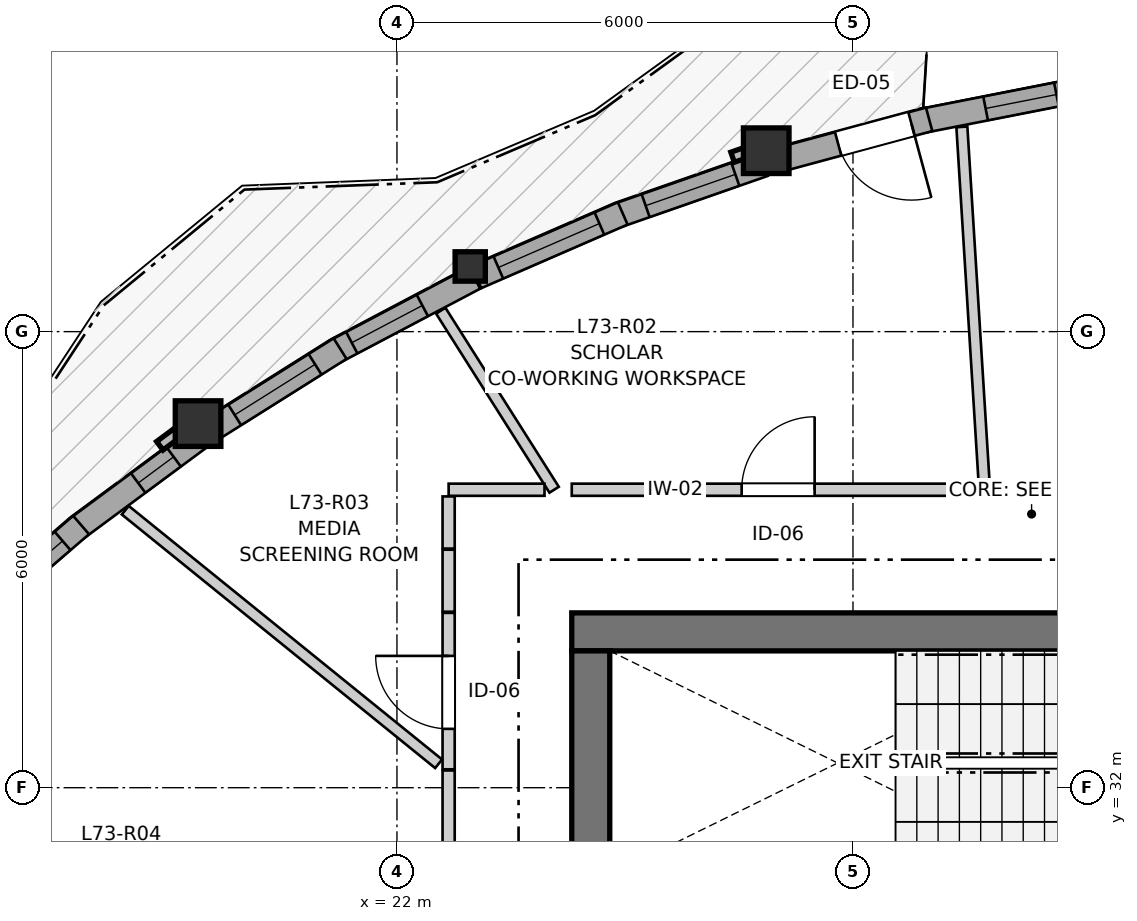
"""IFC4 building model, lengths in metres.
Left out: names, types, materials, properties, quantities, classifications, styles, units other than length and angle.
Written with IfcOpenShell. Run it as: python <this file> out.ifc"""

import sys

from ifc_helpers import new_model, si_unit, direction, frame, frame_2d, origin, origin_2d, place, context, subcontext, project, spatial, rectangle, i_section, extrude, source, transform, mapped, element, fill, save


model = new_model("IFC4")
c1 = context("Model", 3, precision=1e-05, world=origin(), true_north=direction((0.0, 1.0)))
c2 = subcontext(c1, "Body", "Model", "MODEL_VIEW")
j1 = project(units=[si_unit("LENGTHUNIT", "METRE"), si_unit("PLANEANGLEUNIT", "RADIAN")], contexts=[c1])
p1 = place(None, origin())
s1 = spatial("IfcSite", under=j1, at=p1, CompositionType="ELEMENT")
p2 = place(p1, origin())
s2 = spatial("IfcBuilding", under=s1, at=p2, CompositionType="ELEMENT")
p3 = place(p2, frame((0.0, 0.0, 243.6)))
s3 = spatial("IfcBuildingStorey", under=s2, at=p3, CompositionType="ELEMENT", Elevation=243.6)
p4 = place(p3, frame((36.4, 34.05, 0.0), z_axis=(0.0, 0.0, 1.0), x_axis=(-1.0, 0.0, 0.0)))
e1 = element("IfcWall", 1, at=p4, inside=s3, PredefinedType="SHEAR", context=c2, shape_type="SweptSolid", body=[
    extrude(rectangle(XDim=12.1, YDim=0.5, at=frame_2d((6.05, 0.0))), origin(), (0.0, 0.0, 1.0), 2.96),
])
p5 = place(p3, frame((24.55, 33.8, 0.0), z_axis=(0.0, 0.0, 1.0), x_axis=(0.0, -1.0, 0.0)))
e2 = element("IfcWall", 2, at=p5, inside=s3, PredefinedType="SHEAR", context=c2, shape_type="SweptSolid", body=[
    extrude(rectangle(XDim=15.6, YDim=0.5, at=frame_2d((7.8, 0.0))), origin(), (0.0, 0.0, 1.0), 2.96),
])
p6 = place(p5, frame((7.05, 0.0, 0.0)))
e3 = element("IfcOpeningElement", 3, at=p6, cuts=e2, PredefinedType="OPENING", context=c2, shape_type="SweptSolid", body=[
    extrude(rectangle(XDim=1.5, YDim=2.15, at=frame_2d((0.75, 1.075))), frame((0.0, 0.26, 0.0), z_axis=(0.0, -1.0, 0.0), x_axis=(1.0, 0.0, 0.0)), (0.0, 0.0, 1.0), 0.52),
])
p7 = place(p5, frame((3.52, 0.0, 0.0)))
e4 = element("IfcOpeningElement", 4, at=p7, cuts=e2, PredefinedType="OPENING", context=c2, shape_type="SweptSolid", body=[
    extrude(rectangle(XDim=0.86, YDim=2.05, at=frame_2d((0.43, 1.025))), frame((0.0, 0.26, 0.0), z_axis=(0.0, -1.0, 0.0), x_axis=(1.0, 0.0, 0.0)), (0.0, 0.0, 1.0), 0.52),
])
p8 = place(p5, frame((11.22, 0.0, 0.0)))
e5 = element("IfcOpeningElement", 5, at=p8, cuts=e2, PredefinedType="OPENING", context=c2, shape_type="SweptSolid", body=[
    extrude(rectangle(XDim=0.86, YDim=2.05, at=frame_2d((0.43, 1.025))), frame((0.0, 0.26, 0.0), z_axis=(0.0, -1.0, 0.0), x_axis=(1.0, 0.0, 0.0)), (0.0, 0.0, 1.0), 0.52),
])
m1 = source(origin(), c2, "Body", "SweptSolid", [
    extrude(rectangle(XDim=0.6, YDim=0.6, at=origin_2d()), origin(), (0.0, 0.0, 1.0), 2.96),
])
p9 = place(p3, frame((26.859, 40.38, 0.0), z_axis=(0.0, 0.0, 1.0), x_axis=(1.0, 0.0, 0.0)))
e6 = element("IfcColumn", 6, at=p9, inside=s3, PredefinedType="COLUMN", context=c2, shape_type="MappedRepresentation", body=[
    mapped(m1, transform((0.0, 0.0, 0.0), x_axis=(1.0, 0.0, 0.0), y_axis=(0.0, 1.0, 0.0), z_axis=(0.0, 0.0, 1.0), scale=1.0)),
])
m2 = source(origin(), c2, "Body", "SweptSolid", [
    extrude(i_section(OverallWidth=0.398, OverallDepth=0.387, WebThickness=0.019, FlangeThickness=0.03, FilletRadius=0.015, at=origin_2d()), origin(), (0.0, 0.0, 1.0), 2.96),
])
p10 = place(p3, frame((22.964, 38.857, 0.0), z_axis=(0.0, 0.0, 1.0), x_axis=(1.0, 0.0, 0.0)))
e7 = element("IfcColumn", 7, at=p10, inside=s3, PredefinedType="PILASTER", context=c2, shape_type="MappedRepresentation", body=[
    mapped(m2, transform((0.0, 0.0, 0.0), x_axis=(1.0, 0.0, 0.0), y_axis=(0.0, 1.0, 0.0), z_axis=(0.0, 0.0, 1.0), scale=1.0)),
])
p11 = place(p3, frame((19.383, 36.79, 0.0), z_axis=(0.0, 0.0, 1.0), x_axis=(1.0, 0.0, 0.0)))
e8 = element("IfcColumn", 8, at=p11, inside=s3, PredefinedType="COLUMN", context=c2, shape_type="MappedRepresentation", body=[
    mapped(m1, transform((0.0, 0.0, 0.0), x_axis=(1.0, 0.0, 0.0), y_axis=(0.0, 1.0, 0.0), z_axis=(0.0, 0.0, 1.0), scale=1.0)),
])
p12 = place(p3, frame((31.079, 41.198, 0.0), z_axis=(0.0, 0.0, 1.0), x_axis=(-0.981223354781, -0.192874902544, 0.0)))
e9 = element("IfcWall", 9, at=p12, inside=s3, PredefinedType="SOLIDWALL", context=c2, shape_type="SweptSolid", body=[
    extrude(rectangle(XDim=2.202, YDim=0.32, at=frame_2d((1.101, 0.0))), origin(), (0.0, 0.0, 1.0), 2.58),
])
p13 = place(p12, frame((0.409, 0.0, 0.82)))
e10 = element("IfcOpeningElement", 10, at=p13, cuts=e9, PredefinedType="OPENING", context=c2, shape_type="SweptSolid", body=[
    extrude(rectangle(XDim=0.95, YDim=1.35, at=frame_2d((0.475, 0.675))), frame((0.0, 0.17, 0.0), z_axis=(0.0, -1.0, 0.0), x_axis=(1.0, 0.0, 0.0)), (0.0, 0.0, 1.0), 0.34),
])
p14 = place(p3, frame((29.002, 40.793, 0.0), z_axis=(0.0, 0.0, 1.0), x_axis=(-0.965467637734, -0.260523013357, 0.0)))
e11 = element("IfcWall", 11, at=p14, inside=s3, PredefinedType="SOLIDWALL", context=c2, shape_type="SweptSolid", body=[
    extrude(rectangle(XDim=2.087, YDim=0.32, at=frame_2d((1.043, 0.0))), origin(), (0.0, 0.0, 1.0), 2.58),
])
p15 = place(p14, frame((0.24, 0.0, 0.0)))
e12 = element("IfcOpeningElement", 12, at=p15, cuts=e11, PredefinedType="OPENING", context=c2, shape_type="SweptSolid", body=[
    extrude(rectangle(XDim=1.0, YDim=2.1, at=frame_2d((0.5, 1.05))), frame((0.0, 0.17, 0.0), z_axis=(0.0, -1.0, 0.0), x_axis=(1.0, 0.0, 0.0)), (0.0, 0.0, 1.0), 0.34),
])
p16 = place(p3, frame((26.826, 40.199, 0.0), z_axis=(0.0, 0.0, 1.0), x_axis=(-0.944152853185, -0.329507799335, 0.0)))
e13 = element("IfcWall", 13, at=p16, inside=s3, PredefinedType="SOLIDWALL", context=c2, shape_type="SweptSolid", body=[
    extrude(rectangle(XDim=2.052, YDim=0.32, at=frame_2d((1.026, 0.0))), origin(), (0.0, 0.0, 1.0), 2.58),
])
p17 = place(p16, frame((0.396, 0.0, 0.82)))
e14 = element("IfcOpeningElement", 14, at=p17, cuts=e13, PredefinedType="OPENING", context=c2, shape_type="SweptSolid", body=[
    extrude(rectangle(XDim=1.25, YDim=1.35, at=frame_2d((0.625, 0.675))), frame((0.0, 0.17, 0.0), z_axis=(0.0, -1.0, 0.0), x_axis=(1.0, 0.0, 0.0)), (0.0, 0.0, 1.0), 0.34),
])
p18 = place(p3, frame((24.97, 39.555, 0.0), z_axis=(0.0, 0.0, 1.0), x_axis=(-0.917086701486, -0.398687825193, 0.0)))
e15 = element("IfcWall", 15, at=p18, inside=s3, PredefinedType="SOLIDWALL", context=c2, shape_type="SweptSolid", body=[
    extrude(rectangle(XDim=2.099, YDim=0.32, at=frame_2d((1.049, 0.0))), origin(), (0.0, 0.0, 1.0), 2.58),
])
p19 = place(p18, frame((0.334, 0.0, 0.82)))
e16 = element("IfcOpeningElement", 16, at=p19, cuts=e15, PredefinedType="OPENING", context=c2, shape_type="SweptSolid", body=[
    extrude(rectangle(XDim=1.45, YDim=1.25, at=frame_2d((0.725, 0.625))), frame((0.0, 0.17, 0.0), z_axis=(0.0, -1.0, 0.0), x_axis=(1.0, 0.0, 0.0)), (0.0, 0.0, 1.0), 0.34),
])
p20 = place(p3, frame((23.021, 38.707, 0.0), z_axis=(0.0, 0.0, 1.0), x_axis=(-0.884384752847, -0.466758619558, 0.0)))
e17 = element("IfcWall", 17, at=p20, inside=s3, PredefinedType="SOLIDWALL", context=c2, shape_type="SweptSolid", body=[
    extrude(rectangle(XDim=2.087, YDim=0.32, at=frame_2d((1.043, 0.0))), origin(), (0.0, 0.0, 1.0), 2.58),
])
p21 = place(p20, frame((0.777, 0.0, 0.82)))
e18 = element("IfcOpeningElement", 18, at=p21, cuts=e17, PredefinedType="OPENING", context=c2, shape_type="SweptSolid", body=[
    extrude(rectangle(XDim=1.05, YDim=1.45, at=frame_2d((0.525, 0.725))), frame((0.0, 0.17, 0.0), z_axis=(0.0, -1.0, 0.0), x_axis=(1.0, 0.0, 0.0)), (0.0, 0.0, 1.0), 0.34),
])
p22 = place(p3, frame((21.252, 37.777, 0.0), z_axis=(0.0, 0.0, 1.0), x_axis=(-0.846382416581, -0.532575633034, 0.0)))
e19 = element("IfcWall", 19, at=p22, inside=s3, PredefinedType="SOLIDWALL", context=c2, shape_type="SweptSolid", body=[
    extrude(rectangle(XDim=2.017, YDim=0.32, at=frame_2d((1.008, 0.0))), origin(), (0.0, 0.0, 1.0), 2.58),
])
p23 = place(p22, frame((0.388, 0.0, 0.82)))
e20 = element("IfcOpeningElement", 20, at=p23, cuts=e19, PredefinedType="OPENING", context=c2, shape_type="SweptSolid", body=[
    extrude(rectangle(XDim=1.25, YDim=1.35, at=frame_2d((0.625, 0.675))), frame((0.0, 0.17, 0.0), z_axis=(0.0, -1.0, 0.0), x_axis=(1.0, 0.0, 0.0)), (0.0, 0.0, 1.0), 0.34),
])
p24 = place(p3, frame((19.406, 36.608, 0.0), z_axis=(0.0, 0.0, 1.0), x_axis=(-0.803853407146, -0.594827453821, 0.0)))
e21 = element("IfcWall", 21, at=p24, inside=s3, PredefinedType="SOLIDWALL", context=c2, shape_type="SweptSolid", body=[
    extrude(rectangle(XDim=2.029, YDim=0.32, at=frame_2d((1.014, 0.0))), origin(), (0.0, 0.0, 1.0), 2.58),
])
p25 = place(p24, frame((0.428, 0.0, 0.82)))
e22 = element("IfcOpeningElement", 22, at=p25, cuts=e21, PredefinedType="OPENING", context=c2, shape_type="SweptSolid", body=[
    extrude(rectangle(XDim=0.58, YDim=1.35, at=frame_2d((0.29, 0.675))), frame((0.0, 0.17, 0.0), z_axis=(0.0, -1.0, 0.0), x_axis=(1.0, 0.0, 0.0)), (0.0, 0.0, 1.0), 0.34),
])
p26 = place(p3, frame((17.844, 35.456, 0.0), z_axis=(0.0, 0.0, 1.0), x_axis=(-0.757409961601, -0.652939622069, 0.0)))
e23 = element("IfcWall", 23, at=p26, inside=s3, PredefinedType="SOLIDWALL", context=c2, shape_type="SweptSolid", body=[
    extrude(rectangle(XDim=2.122, YDim=0.32, at=frame_2d((1.061, 0.0))), origin(), (0.0, 0.0, 1.0), 2.58),
])
p27 = place(p26, frame((0.321, 0.0, 0.82)))
e24 = element("IfcOpeningElement", 24, at=p27, cuts=e23, PredefinedType="OPENING", context=c2, shape_type="SweptSolid", body=[
    extrude(rectangle(XDim=1.5, YDim=1.45, at=frame_2d((0.75, 0.725))), frame((0.0, 0.17, 0.0), z_axis=(0.0, -1.0, 0.0), x_axis=(1.0, 0.0, 0.0)), (0.0, 0.0, 1.0), 0.34),
])
p28 = place(p3, frame((24.3, 35.92, 0.0), z_axis=(0.0, 0.0, 1.0), x_axis=(1.0, 0.0, 0.0)))
e25 = element("IfcWall", 25, at=p28, inside=s3, PredefinedType="PARTITIONING", context=c2, shape_type="SweptSolid", body=[
    extrude(rectangle(XDim=5.446, YDim=0.16, at=frame_2d((2.723, 0.0))), origin(), (0.0, 0.0, 1.0), 2.96),
])
p29 = place(p28, frame((2.236, 0.0, 0.0)))
e26 = element("IfcOpeningElement", 26, at=p29, cuts=e25, PredefinedType="OPENING", context=c2, shape_type="SweptSolid", body=[
    extrude(rectangle(XDim=0.96, YDim=2.1, at=frame_2d((0.48, 1.05))), frame((0.0, 0.09, 0.0), z_axis=(0.0, -1.0, 0.0), x_axis=(1.0, 0.0, 0.0)), (0.0, 0.0, 1.0), 0.18),
])
p30 = place(p3, frame((22.68, 27.85, 0.0), z_axis=(0.0, 0.0, 1.0), x_axis=(0.0, 1.0, 0.0)))
e27 = element("IfcWall", 27, at=p30, inside=s3, PredefinedType="PARTITIONING", context=c2, shape_type="SweptSolid", body=[
    extrude(rectangle(XDim=4.377, YDim=0.16, at=frame_2d((2.188, 0.0))), origin(), (0.0, 0.0, 1.0), 2.96),
])
p31 = place(p30, frame((1.559, 0.0, 0.0)))
e28 = element("IfcOpeningElement", 28, at=p31, cuts=e27, PredefinedType="OPENING", context=c2, shape_type="SweptSolid", body=[
    extrude(rectangle(XDim=1.3, YDim=2.1, at=frame_2d((0.65, 1.05))), frame((0.0, 0.09, 0.0), z_axis=(0.0, -1.0, 0.0), x_axis=(1.0, 0.0, 0.0)), (0.0, 0.0, 1.0), 0.18),
])
p32 = place(p3, frame((29.761, 35.92, 0.0), z_axis=(0.0, 0.0, 1.0), x_axis=(1.0, 0.0, 0.0)))
e29 = element("IfcWall", 29, at=p32, inside=s3, PredefinedType="PARTITIONING", context=c2, shape_type="SweptSolid", body=[
    extrude(rectangle(XDim=3.61, YDim=0.16, at=frame_2d((1.805, 0.0))), origin(), (0.0, 0.0, 1.0), 2.96),
])
p33 = place(p32, frame((1.133, 0.0, 0.0)))
e30 = element("IfcOpeningElement", 30, at=p33, cuts=e29, PredefinedType="OPENING", context=c2, shape_type="SweptSolid", body=[
    extrude(rectangle(XDim=1.3, YDim=2.1, at=frame_2d((0.65, 1.05))), frame((0.0, 0.09, 0.0), z_axis=(0.0, -1.0, 0.0), x_axis=(1.0, 0.0, 0.0)), (0.0, 0.0, 1.0), 0.18),
])
p34 = place(p3, frame((22.68, 32.242, 0.0), z_axis=(0.0, 0.0, 1.0), x_axis=(0.0, 1.0, 0.0)))
e31 = element("IfcWall", 31, at=p34, inside=s3, PredefinedType="PARTITIONING", context=c2, shape_type="SweptSolid", body=[
    extrude(rectangle(XDim=2.058, YDim=0.16, at=frame_2d((1.029, 0.0))), origin(), (0.0, 0.0, 1.0), 2.628),
])
p35 = place(p34, frame((0.532, 0.0, 0.0)))
e32 = element("IfcOpeningElement", 32, at=p35, cuts=e31, PredefinedType="OPENING", context=c2, shape_type="SweptSolid", body=[
    extrude(rectangle(XDim=0.96, YDim=2.1, at=frame_2d((0.48, 1.05))), frame((0.0, 0.09, 0.0), z_axis=(0.0, -1.0, 0.0), x_axis=(1.0, 0.0, 0.0)), (0.0, 0.0, 1.0), 0.18),
])
p36 = place(p3, frame((18.426, 35.651, 0.0), z_axis=(0.0, 0.0, 1.0), x_axis=(0.777348848989, -0.629069763202, 0.0)))
e33 = element("IfcWall", 33, at=p36, inside=s3, PredefinedType="PARTITIONING", context=c2, shape_type="SweptSolid", body=[
    extrude(rectangle(XDim=5.303, YDim=0.145, at=frame_2d((2.652, 0.0))), origin(), (0.0, 0.0, 1.0), 2.96),
])
p37 = place(p3, frame((29.433, 40.694, 0.0), z_axis=(0.0, 0.0, 1.0), x_axis=(0.062358842424, -0.998053793526, 0.0)))
e34 = element("IfcWall", 34, at=p37, inside=s3, PredefinedType="PARTITIONING", context=c2, shape_type="SweptSolid", body=[
    extrude(rectangle(XDim=4.69, YDim=0.145, at=frame_2d((2.345, 0.0))), origin(), (0.0, 0.0, 1.0), 2.96),
])
p38 = place(p3, frame((22.576, 38.275, 0.0), z_axis=(0.0, 0.0, 1.0), x_axis=(0.535027081988, -0.84483490786, 0.0)))
e35 = element("IfcWall", 35, at=p38, inside=s3, PredefinedType="PARTITIONING", context=c2, shape_type="SweptSolid", body=[
    extrude(rectangle(XDim=2.788, YDim=0.145, at=frame_2d((1.394, 0.0))), origin(), (0.0, 0.0, 1.0), 2.96),
])
p39 = place(p3, frame((22.68, 35.92, 0.0), z_axis=(0.0, 0.0, 1.0), x_axis=(1.0, 0.0, 0.0)))
e36 = element("IfcWall", 36, at=p39, inside=s3, PredefinedType="PARTITIONING", context=c2, shape_type="SweptSolid", body=[
    extrude(rectangle(XDim=1.261, YDim=0.16, at=frame_2d((0.631, 0.0))), origin(), (0.0, 0.0, 1.0), 2.96),
])
p40 = place(p3, frame((22.68, 34.315, 0.0), z_axis=(0.0, 0.0, 1.0), x_axis=(0.0, 1.0, 0.0)))
e37 = element("IfcWall", 37, at=p40, inside=s3, PredefinedType="PARTITIONING", context=c2, shape_type="SweptSolid", body=[
    extrude(rectangle(XDim=0.816, YDim=0.16, at=frame_2d((0.408, 0.0))), origin(), (0.0, 0.0, 1.0), 2.96),
])
p41 = place(p3, frame((22.68, 35.146, 0.0), z_axis=(0.0, 0.0, 1.0), x_axis=(0.0, 1.0, 0.0)))
e38 = element("IfcWall", 38, at=p41, inside=s3, PredefinedType="PARTITIONING", context=c2, shape_type="SweptSolid", body=[
    extrude(rectangle(XDim=0.686, YDim=0.16, at=frame_2d((0.343, 0.0))), origin(), (0.0, 0.0, 1.0), 2.96),
])
m3 = source(origin(), c2, "Body", "SweptSolid", [
    extrude(rectangle(XDim=0.95, YDim=1.35, at=frame_2d((0.475, 0.675))), frame((0.0, 0.03, 0.0), z_axis=(0.0, -1.0, 0.0), x_axis=(1.0, 0.0, 0.0)), (0.0, 0.0, 1.0), 0.06),
])
p42 = place(p13, origin())
e39 = element("IfcWindow", 39, at=p42, inside=s3, PartitioningType="SINGLE_PANEL", PredefinedType="WINDOW", context=c2, shape_type="MappedRepresentation", body=[
    mapped(m3, transform((0.0, 0.0, 0.0), x_axis=(1.0, 0.0, 0.0), y_axis=(0.0, 1.0, 0.0), z_axis=(0.0, 0.0, 1.0), scale=1.0)),
])
fill(e10, e39)
m4 = source(origin(), c2, "Body", "SweptSolid", [
    extrude(rectangle(XDim=1.25, YDim=1.35, at=frame_2d((0.625, 0.675))), frame((0.0, 0.03, 0.0), z_axis=(0.0, -1.0, 0.0), x_axis=(1.0, 0.0, 0.0)), (0.0, 0.0, 1.0), 0.06),
])
p43 = place(p17, origin())
e40 = element("IfcWindow", 40, at=p43, inside=s3, PartitioningType="SINGLE_PANEL", PredefinedType="WINDOW", context=c2, shape_type="MappedRepresentation", body=[
    mapped(m4, transform((0.0, 0.0, 0.0), x_axis=(1.0, 0.0, 0.0), y_axis=(0.0, 1.0, 0.0), z_axis=(0.0, 0.0, 1.0), scale=1.0)),
])
fill(e14, e40)
m5 = source(origin(), c2, "Body", "SweptSolid", [
    extrude(rectangle(XDim=1.45, YDim=1.25, at=frame_2d((0.725, 0.625))), frame((0.0, 0.03, 0.0), z_axis=(0.0, -1.0, 0.0), x_axis=(1.0, 0.0, 0.0)), (0.0, 0.0, 1.0), 0.06),
])
p44 = place(p19, origin())
e41 = element("IfcWindow", 41, at=p44, inside=s3, PartitioningType="SINGLE_PANEL", PredefinedType="WINDOW", context=c2, shape_type="MappedRepresentation", body=[
    mapped(m5, transform((0.0, 0.0, 0.0), x_axis=(1.0, 0.0, 0.0), y_axis=(0.0, 1.0, 0.0), z_axis=(0.0, 0.0, 1.0), scale=1.0)),
])
fill(e16, e41)
m6 = source(origin(), c2, "Body", "SweptSolid", [
    extrude(rectangle(XDim=1.05, YDim=1.45, at=frame_2d((0.525, 0.725))), frame((0.0, 0.03, 0.0), z_axis=(0.0, -1.0, 0.0), x_axis=(1.0, 0.0, 0.0)), (0.0, 0.0, 1.0), 0.06),
])
p45 = place(p21, origin())
e42 = element("IfcWindow", 42, at=p45, inside=s3, PartitioningType="SINGLE_PANEL", PredefinedType="WINDOW", context=c2, shape_type="MappedRepresentation", body=[
    mapped(m6, transform((0.0, 0.0, 0.0), x_axis=(1.0, 0.0, 0.0), y_axis=(0.0, 1.0, 0.0), z_axis=(0.0, 0.0, 1.0), scale=1.0)),
])
fill(e18, e42)
p46 = place(p23, origin())
e43 = element("IfcWindow", 43, at=p46, inside=s3, PartitioningType="SINGLE_PANEL", PredefinedType="WINDOW", context=c2, shape_type="MappedRepresentation", body=[
    mapped(m4, transform((0.0, 0.0, 0.0), x_axis=(1.0, 0.0, 0.0), y_axis=(0.0, 1.0, 0.0), z_axis=(0.0, 0.0, 1.0), scale=1.0)),
])
fill(e20, e43)
m7 = source(origin(), c2, "Body", "SweptSolid", [
    extrude(rectangle(XDim=0.58, YDim=1.35, at=frame_2d((0.29, 0.675))), frame((0.0, 0.03, 0.0), z_axis=(0.0, -1.0, 0.0), x_axis=(1.0, 0.0, 0.0)), (0.0, 0.0, 1.0), 0.06),
])
p47 = place(p25, origin())
e44 = element("IfcWindow", 44, at=p47, inside=s3, PartitioningType="SINGLE_PANEL", PredefinedType="WINDOW", context=c2, shape_type="MappedRepresentation", body=[
    mapped(m7, transform((0.0, 0.0, 0.0), x_axis=(1.0, 0.0, 0.0), y_axis=(0.0, 1.0, 0.0), z_axis=(0.0, 0.0, 1.0), scale=1.0)),
])
fill(e22, e44)
m8 = source(origin(), c2, "Body", "SweptSolid", [
    extrude(rectangle(XDim=1.5, YDim=1.45, at=frame_2d((0.75, 0.725))), frame((0.0, 0.03, 0.0), z_axis=(0.0, -1.0, 0.0), x_axis=(1.0, 0.0, 0.0)), (0.0, 0.0, 1.0), 0.06),
])
p48 = place(p27, origin())
e45 = element("IfcWindow", 45, at=p48, inside=s3, PartitioningType="SINGLE_PANEL", PredefinedType="WINDOW", context=c2, shape_type="MappedRepresentation", body=[
    mapped(m8, transform((0.0, 0.0, 0.0), x_axis=(1.0, 0.0, 0.0), y_axis=(0.0, 1.0, 0.0), z_axis=(0.0, 0.0, 1.0), scale=1.0)),
])
fill(e24, e45)
m9 = source(origin(), c2, "Body", "SweptSolid", [
    extrude(rectangle(XDim=1.0, YDim=2.1, at=frame_2d((0.5, 1.05))), frame((0.0, 0.025, 0.0), z_axis=(0.0, -1.0, 0.0), x_axis=(1.0, 0.0, 0.0)), (0.0, 0.0, 1.0), 0.05),
])
p49 = place(p15, origin())
e46 = element("IfcDoor", 46, at=p49, inside=s3, OperationType="SINGLE_SWING_LEFT", PredefinedType="DOOR", context=c2, shape_type="MappedRepresentation", body=[
    mapped(m9, transform((0.0, 0.0, 0.0), x_axis=(1.0, 0.0, 0.0), y_axis=(0.0, 1.0, 0.0), z_axis=(0.0, 0.0, 1.0), scale=1.0)),
])
fill(e12, e46)
m10 = source(origin(), c2, "Body", "SweptSolid", [
    extrude(rectangle(XDim=0.96, YDim=2.1, at=frame_2d((0.48, 1.05))), frame((0.0, 0.025, 0.0), z_axis=(0.0, -1.0, 0.0), x_axis=(1.0, 0.0, 0.0)), (0.0, 0.0, 1.0), 0.05),
])
p50 = place(p29, origin())
e47 = element("IfcDoor", 47, at=p50, inside=s3, OperationType="SINGLE_SWING_RIGHT", PredefinedType="DOOR", context=c2, shape_type="MappedRepresentation", body=[
    mapped(m10, transform((0.0, 0.0, 0.0), x_axis=(1.0, 0.0, 0.0), y_axis=(0.0, 1.0, 0.0), z_axis=(0.0, 0.0, 1.0), scale=1.0)),
])
fill(e26, e47)
p51 = place(p35, origin())
e48 = element("IfcDoor", 48, at=p51, inside=s3, OperationType="SINGLE_SWING_RIGHT", PredefinedType="DOOR", context=c2, shape_type="MappedRepresentation", body=[
    mapped(m10, transform((0.0, 0.0, 0.0), x_axis=(1.0, 0.0, 0.0), y_axis=(0.0, 1.0, 0.0), z_axis=(0.0, 0.0, 1.0), scale=1.0)),
])
fill(e32, e48)
save(model, sys.argv[1])
